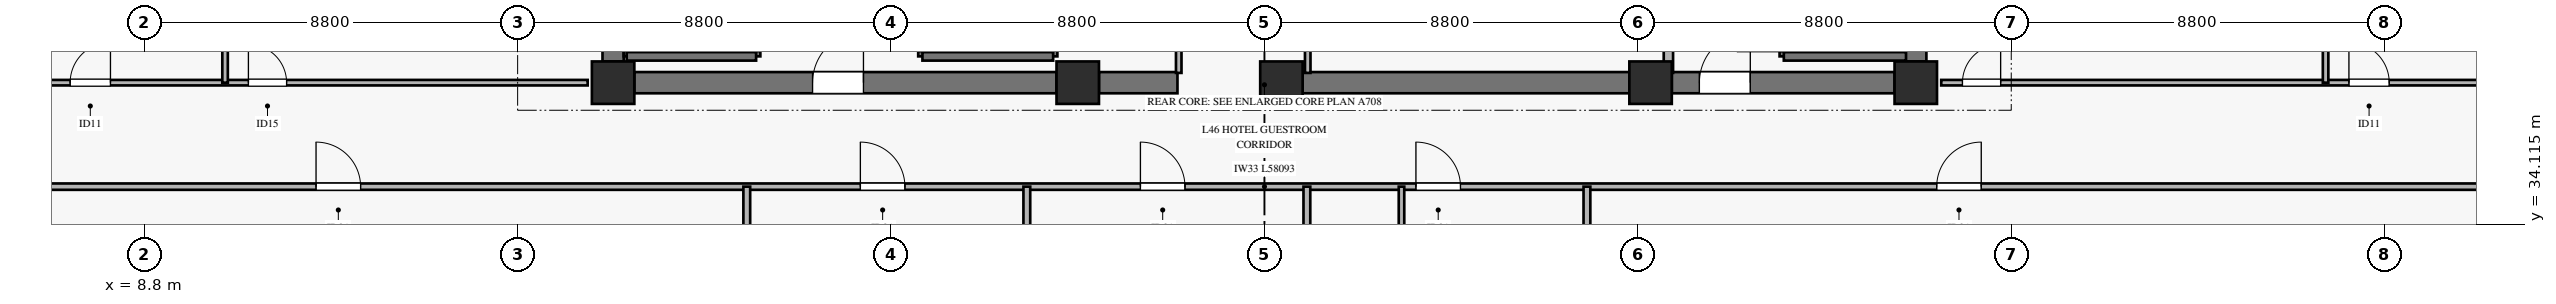
"""IFC4 building model, lengths in metres.
Left out: names, types, materials, properties, quantities, classifications, styles, units other than length and angle.
Written with IfcOpenShell. Run it as: python <this file> out.ifc"""

import sys

from ifc_helpers import new_model, si_unit, direction, frame, frame_2d, origin, origin_2d, place, context, subcontext, project, spatial, rectangle, extrude, source, transform, mapped, element, fill, save


model = new_model("IFC4")
c1 = context("Model", 3, precision=1e-05, world=origin(), true_north=direction((0.0, 1.0)))
c2 = subcontext(c1, "Body", "Model", "MODEL_VIEW")
j1 = project(units=[si_unit("LENGTHUNIT", "METRE"), si_unit("PLANEANGLEUNIT", "RADIAN")], contexts=[c1])
p1 = place(None, origin())
s1 = spatial("IfcSite", under=j1, at=p1, CompositionType="ELEMENT")
p2 = place(p1, origin())
s2 = spatial("IfcBuilding", under=s1, at=p2, CompositionType="ELEMENT")
p3 = place(p2, frame((0.0, 0.0, 184.2)))
s3 = spatial("IfcBuildingStorey", under=s2, at=p3, CompositionType="ELEMENT", Elevation=184.2)
m1 = source(origin(), c2, "Body", "SweptSolid", [
    extrude(rectangle(XDim=1.0, YDim=1.0, at=origin_2d()), origin(), (0.0, 0.0, 1.0), 3.27),
])
for number, where, z_axis, x_axis in (
    (1, (19.85, 37.45, 0.0), (0.0, 0.0, 1.0), (1.0, 0.0, 0.0)),
    (2, (30.8, 37.45, 0.0), (0.0, 0.0, 1.0), (1.0, 0.0, 0.0)),
    (3, (35.6, 37.45, 0.0), (0.0, 0.0, 1.0), (1.0, 0.0, 0.0)),
    (4, (44.3, 37.45, 0.0), (0.0, 0.0, 1.0), (1.0, 0.0, 0.0)),
    (5, (50.55, 37.45, 0.0), (0.0, 0.0, 1.0), (1.0, 0.0, 0.0)),
):
    element("IfcColumn", number, at=place(p3, frame(where, z_axis=z_axis, x_axis=x_axis)), inside=s3, PredefinedType="PILASTER", context=c2, shape_type="MappedRepresentation", body=[
        mapped(m1, transform((0.0, 0.0, 0.0), x_axis=(1.0, 0.0, 0.0), y_axis=(0.0, 1.0, 0.0), z_axis=(0.0, 0.0, 1.0), scale=1.0)),
    ])
p4 = place(p3, frame((20.35, 37.45, 0.0), z_axis=(0.0, 0.0, 1.0), x_axis=(1.0, 0.0, 0.0)))
e6 = element("IfcWall", 6, at=p4, inside=s3, PredefinedType="SHEAR", context=c2, shape_type="SweptSolid", body=[
    extrude(rectangle(XDim=9.95, YDim=0.5, at=frame_2d((4.975, 0.0))), origin(), (0.0, 0.0, 1.0), 3.27),
])
p5 = place(p4, frame((4.2, 0.0, 0.0)))
e7 = element("IfcOpeningElement", 7, at=p5, cuts=e6, PredefinedType="OPENING", context=c2, shape_type="SweptSolid", body=[
    extrude(rectangle(XDim=1.2, YDim=2.15, at=frame_2d((0.6, 1.075))), frame((0.0, 0.26, 0.0), z_axis=(0.0, -1.0, 0.0), x_axis=(1.0, 0.0, 0.0)), (0.0, 0.0, 1.0), 0.52),
])
p6 = place(p3, frame((31.3, 37.45, 0.0), z_axis=(0.0, 0.0, 1.0), x_axis=(1.0, 0.0, 0.0)))
e8 = element("IfcWall", 8, at=p6, inside=s3, PredefinedType="SHEAR", context=c2, shape_type="SweptSolid", body=[
    extrude(rectangle(XDim=1.85, YDim=0.5, at=frame_2d((0.925, 0.0))), origin(), (0.0, 0.0, 1.0), 3.27),
])
p7 = place(p3, frame((36.1, 37.45, 0.0), z_axis=(0.0, 0.0, 1.0), x_axis=(1.0, 0.0, 0.0)))
e9 = element("IfcWall", 9, at=p7, inside=s3, PredefinedType="SHEAR", context=c2, shape_type="SweptSolid", body=[
    extrude(rectangle(XDim=7.7, YDim=0.5, at=frame_2d((3.85, 0.0))), origin(), (0.0, 0.0, 1.0), 3.27),
])
p8 = place(p3, frame((44.8, 37.45, 0.0), z_axis=(0.0, 0.0, 1.0), x_axis=(1.0, 0.0, 0.0)))
e10 = element("IfcWall", 10, at=p8, inside=s3, PredefinedType="SHEAR", context=c2, shape_type="SweptSolid", body=[
    extrude(rectangle(XDim=5.25, YDim=0.5, at=frame_2d((2.625, 0.0))), origin(), (0.0, 0.0, 1.0), 3.27),
])
p9 = place(p8, frame((0.65, 0.0, 0.0)))
e11 = element("IfcOpeningElement", 11, at=p9, cuts=e10, PredefinedType="OPENING", context=c2, shape_type="SweptSolid", body=[
    extrude(rectangle(XDim=1.2, YDim=2.15, at=frame_2d((0.6, 1.075))), frame((0.0, 0.26, 0.0), z_axis=(0.0, -1.0, 0.0), x_axis=(1.0, 0.0, 0.0)), (0.0, 0.0, 1.0), 0.52),
])
for number, where, z_axis, x_axis in (
    (12, (19.85, 37.95, 0.0), (0.0, 0.0, 1.0), (0.0, 1.0, 0.0)),
    (13, (50.55, 37.95, 0.0), (0.0, 0.0, 1.0), (0.0, 1.0, 0.0)),
):
    element("IfcWall", number, at=place(p3, frame(where, z_axis=z_axis, x_axis=x_axis)), inside=s3, PredefinedType="SHEAR", context=c2, shape_type="SweptSolid", body=[
        extrude(rectangle(XDim=8.1, YDim=0.5, at=frame_2d((4.05, 0.0))), origin(), (0.0, 0.0, 1.0), 3.27),
    ])
p10 = place(p3, frame((20.17, 38.07, 0.0), z_axis=(0.0, 0.0, 1.0), x_axis=(0.0, 1.0, 0.0)))
e14 = element("IfcWall", 14, at=p10, inside=s3, PredefinedType="SOLIDWALL", context=c2, shape_type="SweptSolid", body=[
    extrude(rectangle(XDim=7.25, YDim=0.14, at=frame_2d((3.625, 0.0))), origin(), (0.0, 0.0, 1.0), 3.5),
])
p11 = place(p3, frame((23.22, 38.07, 0.0), z_axis=(0.0, 0.0, 1.0), x_axis=(0.0, 1.0, 0.0)))
e15 = element("IfcWall", 15, at=p11, inside=s3, PredefinedType="SOLIDWALL", context=c2, shape_type="SweptSolid", body=[
    extrude(rectangle(XDim=7.25, YDim=0.2, at=frame_2d((3.625, 0.0))), origin(), (0.0, 0.0, 1.0), 3.5),
])
p12 = place(p11, frame((0.11, 0.0, 0.0)))
e16 = element("IfcOpeningElement", 16, at=p12, cuts=e15, PredefinedType="OPENING", context=c2, shape_type="SweptSolid", body=[
    extrude(rectangle(XDim=1.1, YDim=2.15, at=frame_2d((0.55, 1.075))), frame((0.0, 0.11, 0.0), z_axis=(0.0, -1.0, 0.0), x_axis=(1.0, 0.0, 0.0)), (0.0, 0.0, 1.0), 0.22),
])
p13 = place(p3, frame((20.17, 38.07, 0.0), z_axis=(0.0, 0.0, 1.0), x_axis=(1.0, 0.0, 0.0)))
e17 = element("IfcWall", 17, at=p13, inside=s3, PredefinedType="SOLIDWALL", context=c2, shape_type="SweptSolid", body=[
    extrude(rectangle(XDim=3.05, YDim=0.2, at=frame_2d((1.525, 0.0))), origin(), (0.0, 0.0, 1.0), 3.5),
])
p14 = place(p3, frame((27.14, 38.07, 0.0), z_axis=(0.0, 0.0, 1.0), x_axis=(0.0, 1.0, 0.0)))
e18 = element("IfcWall", 18, at=p14, inside=s3, PredefinedType="SOLIDWALL", context=c2, shape_type="SweptSolid", body=[
    extrude(rectangle(XDim=7.25, YDim=0.2, at=frame_2d((3.625, 0.0))), origin(), (0.0, 0.0, 1.0), 3.5),
])
p15 = place(p14, frame((0.11, 0.0, 0.0)))
e19 = element("IfcOpeningElement", 19, at=p15, cuts=e18, PredefinedType="OPENING", context=c2, shape_type="SweptSolid", body=[
    extrude(rectangle(XDim=1.1, YDim=2.15, at=frame_2d((0.55, 1.075))), frame((0.0, 0.11, 0.0), z_axis=(0.0, -1.0, 0.0), x_axis=(1.0, 0.0, 0.0)), (0.0, 0.0, 1.0), 0.22),
])
p16 = place(p3, frame((30.22, 38.07, 0.0), z_axis=(0.0, 0.0, 1.0), x_axis=(0.0, 1.0, 0.0)))
e20 = element("IfcWall", 20, at=p16, inside=s3, PredefinedType="SOLIDWALL", context=c2, shape_type="SweptSolid", body=[
    extrude(rectangle(XDim=7.25, YDim=0.2, at=frame_2d((3.625, 0.0))), origin(), (0.0, 0.0, 1.0), 3.5),
])
p17 = place(p3, frame((27.14, 38.07, 0.0), z_axis=(0.0, 0.0, 1.0), x_axis=(1.0, 0.0, 0.0)))
e21 = element("IfcWall", 21, at=p17, inside=s3, PredefinedType="SOLIDWALL", context=c2, shape_type="SweptSolid", body=[
    extrude(rectangle(XDim=3.08, YDim=0.2, at=frame_2d((1.54, 0.0))), origin(), (0.0, 0.0, 1.0), 3.5),
])
p18 = place(p3, frame((47.44, 38.07, 0.0), z_axis=(0.0, 0.0, 1.0), x_axis=(0.0, 1.0, 0.0)))
e22 = element("IfcWall", 22, at=p18, inside=s3, PredefinedType="SOLIDWALL", context=c2, shape_type="SweptSolid", body=[
    extrude(rectangle(XDim=7.25, YDim=0.2, at=frame_2d((3.625, 0.0))), origin(), (0.0, 0.0, 1.0), 3.5),
])
p19 = place(p18, frame((0.11, 0.0, 0.0)))
e23 = element("IfcOpeningElement", 23, at=p19, cuts=e22, PredefinedType="OPENING", context=c2, shape_type="SweptSolid", body=[
    extrude(rectangle(XDim=1.1, YDim=2.15, at=frame_2d((0.55, 1.075))), frame((0.0, 0.11, 0.0), z_axis=(0.0, -1.0, 0.0), x_axis=(1.0, 0.0, 0.0)), (0.0, 0.0, 1.0), 0.22),
])
p20 = place(p3, frame((47.44, 38.07, 0.0), z_axis=(0.0, 0.0, 1.0), x_axis=(1.0, 0.0, 0.0)))
e24 = element("IfcWall", 24, at=p20, inside=s3, PredefinedType="SOLIDWALL", context=c2, shape_type="SweptSolid", body=[
    extrude(rectangle(XDim=2.88, YDim=0.2, at=frame_2d((1.44, 0.0))), origin(), (0.0, 0.0, 1.0), 3.5),
])
p21 = place(p3, frame((44.72, 37.68, 0.0), z_axis=(0.0, 0.0, 1.0), x_axis=(0.0, 1.0, 0.0)))
e25 = element("IfcWall", 25, at=p21, inside=s3, PredefinedType="SOLIDWALL", context=c2, shape_type="SweptSolid", body=[
    extrude(rectangle(XDim=7.54, YDim=0.22, at=frame_2d((3.77, 0.0))), origin(), (0.0, 0.0, 1.0), 3.27),
])
p22 = place(p3, frame((33.18, 37.68, 0.0), z_axis=(0.0, 0.0, 1.0), x_axis=(0.0, 1.0, 0.0)))
e26 = element("IfcWall", 26, at=p22, inside=s3, PredefinedType="PARTITIONING", context=c2, shape_type="SweptSolid", body=[
    extrude(rectangle(XDim=6.47, YDim=0.13, at=frame_2d((3.235, 0.0))), origin(), (0.0, 0.0, 1.0), 2.355),
])
p23 = place(p22, frame((0.92, 0.0, 0.0)))
e27 = element("IfcOpeningElement", 27, at=p23, cuts=e26, PredefinedType="OPENING", context=c2, shape_type="SweptSolid", body=[
    extrude(rectangle(XDim=0.9, YDim=2.1, at=frame_2d((0.45, 1.05))), frame((0.0, 0.075, 0.0), z_axis=(0.0, -1.0, 0.0), x_axis=(1.0, 0.0, 0.0)), (0.0, 0.0, 1.0), 0.15),
])
p24 = place(p22, frame((3.92, 0.0, 0.0)))
e28 = element("IfcOpeningElement", 28, at=p24, cuts=e26, PredefinedType="OPENING", context=c2, shape_type="SweptSolid", body=[
    extrude(rectangle(XDim=0.9, YDim=2.1, at=frame_2d((0.45, 1.05))), frame((0.0, 0.075, 0.0), z_axis=(0.0, -1.0, 0.0), x_axis=(1.0, 0.0, 0.0)), (0.0, 0.0, 1.0), 0.15),
])
p25 = place(p3, frame((36.22, 37.68, 0.0), z_axis=(0.0, 0.0, 1.0), x_axis=(0.0, 1.0, 0.0)))
e29 = element("IfcWall", 29, at=p25, inside=s3, PredefinedType="PARTITIONING", context=c2, shape_type="SweptSolid", body=[
    extrude(rectangle(XDim=2.24, YDim=0.13, at=frame_2d((1.12, 0.0))), origin(), (0.0, 0.0, 1.0), 3.27),
])
p26 = place(p25, frame((0.88, 0.0, 0.0)))
e30 = element("IfcOpeningElement", 30, at=p26, cuts=e29, PredefinedType="OPENING", context=c2, shape_type="SweptSolid", body=[
    extrude(rectangle(XDim=0.9, YDim=2.1, at=frame_2d((0.45, 1.05))), frame((0.0, 0.075, 0.0), z_axis=(0.0, -1.0, 0.0), x_axis=(1.0, 0.0, 0.0)), (0.0, 0.0, 1.0), 0.15),
])
p27 = place(p3, frame((6.154, 35.0, 0.0), z_axis=(0.0, 0.0, 1.0), x_axis=(1.0, 0.0, 0.0)))
e31 = element("IfcWall", 31, at=p27, inside=s3, PredefinedType="PARTITIONING", context=c2, shape_type="SweptSolid", body=[
    extrude(rectangle(XDim=58.093, YDim=0.15, at=frame_2d((29.046, 0.0))), origin(), (0.0, 0.0, 1.0), 2.455),
])
p28 = place(p27, frame((6.695, 0.0, 0.0)))
e32 = element("IfcOpeningElement", 32, at=p28, cuts=e31, PredefinedType="OPENING", context=c2, shape_type="SweptSolid", body=[
    extrude(rectangle(XDim=1.05, YDim=2.15, at=frame_2d((0.525, 1.075))), frame((0.0, 0.085, 0.0), z_axis=(0.0, -1.0, 0.0), x_axis=(1.0, 0.0, 0.0)), (0.0, 0.0, 1.0), 0.17),
])
p29 = place(p27, frame((19.523, 0.0, 0.0)))
e33 = element("IfcOpeningElement", 33, at=p29, cuts=e31, PredefinedType="OPENING", context=c2, shape_type="SweptSolid", body=[
    extrude(rectangle(XDim=1.05, YDim=2.15, at=frame_2d((0.525, 1.075))), frame((0.0, 0.085, 0.0), z_axis=(0.0, -1.0, 0.0), x_axis=(1.0, 0.0, 0.0)), (0.0, 0.0, 1.0), 0.17),
])
p30 = place(p27, frame((26.123, 0.0, 0.0)))
e34 = element("IfcOpeningElement", 34, at=p30, cuts=e31, PredefinedType="OPENING", context=c2, shape_type="SweptSolid", body=[
    extrude(rectangle(XDim=1.05, YDim=2.15, at=frame_2d((0.525, 1.075))), frame((0.0, 0.085, 0.0), z_axis=(0.0, -1.0, 0.0), x_axis=(1.0, 0.0, 0.0)), (0.0, 0.0, 1.0), 0.17),
])
p31 = place(p27, frame((32.616, 0.0, 0.0)))
e35 = element("IfcOpeningElement", 35, at=p31, cuts=e31, PredefinedType="OPENING", context=c2, shape_type="SweptSolid", body=[
    extrude(rectangle(XDim=1.05, YDim=2.15, at=frame_2d((0.525, 1.075))), frame((0.0, 0.085, 0.0), z_axis=(0.0, -1.0, 0.0), x_axis=(1.0, 0.0, 0.0)), (0.0, 0.0, 1.0), 0.17),
])
p32 = place(p27, frame((44.889, 0.0, 0.0)))
e36 = element("IfcOpeningElement", 36, at=p32, cuts=e31, PredefinedType="OPENING", context=c2, shape_type="SweptSolid", body=[
    extrude(rectangle(XDim=1.05, YDim=2.15, at=frame_2d((0.525, 1.075))), frame((0.0, 0.085, 0.0), z_axis=(0.0, -1.0, 0.0), x_axis=(1.0, 0.0, 0.0)), (0.0, 0.0, 1.0), 0.17),
])
for number, where, z_axis, x_axis in (
    (37, (23.0, 10.154, 0.0), (0.0, 0.0, 1.0), (0.0, 1.0, 0.0)),
    (38, (29.6, 10.154, 0.0), (0.0, 0.0, 1.0), (0.0, 1.0, 0.0)),
    (39, (36.2, 10.154, 0.0), (0.0, 0.0, 1.0), (0.0, 1.0, 0.0)),
):
    element("IfcWall", number, at=place(p3, frame(where, z_axis=z_axis, x_axis=x_axis)), inside=s3, PredefinedType="PARTITIONING", context=c2, shape_type="SweptSolid", body=[
        extrude(rectangle(XDim=24.846, YDim=0.16, at=frame_2d((12.423, 0.0))), origin(), (0.0, 0.0, 1.0), 2.755),
    ])
p33 = place(p3, frame((38.43, 32.45, 0.0), z_axis=(0.0, 0.0, 1.0), x_axis=(0.0, 1.0, 0.0)))
e40 = element("IfcWall", 40, at=p33, inside=s3, PredefinedType="PARTITIONING", context=c2, shape_type="SweptSolid", body=[
    extrude(rectangle(XDim=2.55, YDim=0.13, at=frame_2d((1.275, 0.0))), origin(), (0.0, 0.0, 1.0), 2.805),
])
p34 = place(p3, frame((42.8, 10.154, 0.0), z_axis=(0.0, 0.0, 1.0), x_axis=(0.0, 1.0, 0.0)))
e41 = element("IfcWall", 41, at=p34, inside=s3, PredefinedType="PARTITIONING", context=c2, shape_type="SweptSolid", body=[
    extrude(rectangle(XDim=24.846, YDim=0.16, at=frame_2d((12.423, 0.0))), origin(), (0.0, 0.0, 1.0), 2.755),
])
p35 = place(p3, frame((6.154, 37.45, 0.0), z_axis=(0.0, 0.0, 1.0), x_axis=(1.0, 0.0, 0.0)))
e42 = element("IfcWall", 42, at=p35, inside=s3, PredefinedType="PARTITIONING", context=c2, shape_type="SweptSolid", body=[
    extrude(rectangle(XDim=13.096, YDim=0.13, at=frame_2d((6.548, 0.0))), origin(), (0.0, 0.0, 1.0), 2.755),
])
p36 = place(p35, frame((0.9, 0.0, 0.0)))
e43 = element("IfcOpeningElement", 43, at=p36, cuts=e42, PredefinedType="OPENING", context=c2, shape_type="SweptSolid", body=[
    extrude(rectangle(XDim=0.95, YDim=2.1, at=frame_2d((0.475, 1.05))), frame((0.0, 0.075, 0.0), z_axis=(0.0, -1.0, 0.0), x_axis=(1.0, 0.0, 0.0)), (0.0, 0.0, 1.0), 0.15),
])
p37 = place(p35, frame((5.101, 0.0, 0.0)))
e44 = element("IfcOpeningElement", 44, at=p37, cuts=e42, PredefinedType="OPENING", context=c2, shape_type="SweptSolid", body=[
    extrude(rectangle(XDim=0.9, YDim=2.1, at=frame_2d((0.45, 1.05))), frame((0.0, 0.075, 0.0), z_axis=(0.0, -1.0, 0.0), x_axis=(1.0, 0.0, 0.0)), (0.0, 0.0, 1.0), 0.15),
])
p38 = place(p3, frame((10.705, 37.45, 0.0), z_axis=(0.0, 0.0, 1.0), x_axis=(0.0, 1.0, 0.0)))
e45 = element("IfcWall", 45, at=p38, inside=s3, PredefinedType="PARTITIONING", context=c2, shape_type="SweptSolid", body=[
    extrude(rectangle(XDim=8.8, YDim=0.13, at=frame_2d((4.4, 0.0))), origin(), (0.0, 0.0, 1.0), 3.27),
])
p39 = place(p3, frame((51.15, 37.45, 0.0), z_axis=(0.0, 0.0, 1.0), x_axis=(1.0, 0.0, 0.0)))
e46 = element("IfcWall", 46, at=p39, inside=s3, PredefinedType="PARTITIONING", context=c2, shape_type="SweptSolid", body=[
    extrude(rectangle(XDim=13.097, YDim=0.13, at=frame_2d((6.549, 0.0))), origin(), (0.0, 0.0, 1.0), 2.755),
])
p40 = place(p39, frame((0.5, 0.0, 0.0)))
e47 = element("IfcOpeningElement", 47, at=p40, cuts=e46, PredefinedType="OPENING", context=c2, shape_type="SweptSolid", body=[
    extrude(rectangle(XDim=0.9, YDim=2.1, at=frame_2d((0.45, 1.05))), frame((0.0, 0.075, 0.0), z_axis=(0.0, -1.0, 0.0), x_axis=(1.0, 0.0, 0.0)), (0.0, 0.0, 1.0), 0.15),
])
p41 = place(p39, frame((9.608, 0.0, 0.0)))
e48 = element("IfcOpeningElement", 48, at=p41, cuts=e46, PredefinedType="OPENING", context=c2, shape_type="SweptSolid", body=[
    extrude(rectangle(XDim=0.95, YDim=2.1, at=frame_2d((0.475, 1.05))), frame((0.0, 0.075, 0.0), z_axis=(0.0, -1.0, 0.0), x_axis=(1.0, 0.0, 0.0)), (0.0, 0.0, 1.0), 0.15),
])
p42 = place(p3, frame((60.208, 37.45, 0.0), z_axis=(0.0, 0.0, 1.0), x_axis=(0.0, 1.0, 0.0)))
e49 = element("IfcWall", 49, at=p42, inside=s3, PredefinedType="PARTITIONING", context=c2, shape_type="SweptSolid", body=[
    extrude(rectangle(XDim=8.8, YDim=0.13, at=frame_2d((4.4, 0.0))), origin(), (0.0, 0.0, 1.0), 3.27),
])
m2 = source(origin(), c2, "Body", "SweptSolid", [
    extrude(rectangle(XDim=1.2, YDim=2.15, at=frame_2d((0.6, 1.075))), frame((0.0, 0.025, 0.0), z_axis=(0.0, -1.0, 0.0), x_axis=(1.0, 0.0, 0.0)), (0.0, 0.0, 1.0), 0.05),
])
p43 = place(p5, origin())
e50 = element("IfcDoor", 50, at=p43, inside=s3, OperationType="SINGLE_SWING_RIGHT", PredefinedType="DOOR", context=c2, shape_type="MappedRepresentation", body=[
    mapped(m2, transform((0.0, 0.0, 0.0), x_axis=(1.0, 0.0, 0.0), y_axis=(0.0, 1.0, 0.0), z_axis=(0.0, 0.0, 1.0), scale=1.0)),
])
fill(e7, e50)
p44 = place(p9, origin())
e51 = element("IfcDoor", 51, at=p44, inside=s3, OperationType="SINGLE_SWING_RIGHT", PredefinedType="DOOR", context=c2, shape_type="MappedRepresentation", body=[
    mapped(m2, transform((0.0, 0.0, 0.0), x_axis=(1.0, 0.0, 0.0), y_axis=(0.0, 1.0, 0.0), z_axis=(0.0, 0.0, 1.0), scale=1.0)),
])
fill(e11, e51)
m3 = source(origin(), c2, "Body", "SweptSolid", [
    extrude(rectangle(XDim=1.05, YDim=2.15, at=frame_2d((0.525, 1.075))), frame((0.0, 0.025, 0.0), z_axis=(0.0, -1.0, 0.0), x_axis=(1.0, 0.0, 0.0)), (0.0, 0.0, 1.0), 0.05),
])
p45 = place(p28, origin())
e52 = element("IfcDoor", 52, at=p45, inside=s3, OperationType="SINGLE_SWING_LEFT", PredefinedType="DOOR", context=c2, shape_type="MappedRepresentation", body=[
    mapped(m3, transform((0.0, 0.0, 0.0), x_axis=(1.0, 0.0, 0.0), y_axis=(0.0, 1.0, 0.0), z_axis=(0.0, 0.0, 1.0), scale=1.0)),
])
fill(e32, e52)
p46 = place(p29, origin())
e53 = element("IfcDoor", 53, at=p46, inside=s3, OperationType="SINGLE_SWING_LEFT", PredefinedType="DOOR", context=c2, shape_type="MappedRepresentation", body=[
    mapped(m3, transform((0.0, 0.0, 0.0), x_axis=(1.0, 0.0, 0.0), y_axis=(0.0, 1.0, 0.0), z_axis=(0.0, 0.0, 1.0), scale=1.0)),
])
fill(e33, e53)
p47 = place(p30, origin())
e54 = element("IfcDoor", 54, at=p47, inside=s3, OperationType="SINGLE_SWING_LEFT", PredefinedType="DOOR", context=c2, shape_type="MappedRepresentation", body=[
    mapped(m3, transform((0.0, 0.0, 0.0), x_axis=(1.0, 0.0, 0.0), y_axis=(0.0, 1.0, 0.0), z_axis=(0.0, 0.0, 1.0), scale=1.0)),
])
fill(e34, e54)
p48 = place(p31, origin())
e55 = element("IfcDoor", 55, at=p48, inside=s3, OperationType="SINGLE_SWING_LEFT", PredefinedType="DOOR", context=c2, shape_type="MappedRepresentation", body=[
    mapped(m3, transform((0.0, 0.0, 0.0), x_axis=(1.0, 0.0, 0.0), y_axis=(0.0, 1.0, 0.0), z_axis=(0.0, 0.0, 1.0), scale=1.0)),
])
fill(e35, e55)
p49 = place(p32, origin())
e56 = element("IfcDoor", 56, at=p49, inside=s3, OperationType="SINGLE_SWING_RIGHT", PredefinedType="DOOR", context=c2, shape_type="MappedRepresentation", body=[
    mapped(m3, transform((0.0, 0.0, 0.0), x_axis=(1.0, 0.0, 0.0), y_axis=(0.0, 1.0, 0.0), z_axis=(0.0, 0.0, 1.0), scale=1.0)),
])
fill(e36, e56)
m4 = source(origin(), c2, "Body", "SweptSolid", [
    extrude(rectangle(XDim=0.95, YDim=2.1, at=frame_2d((0.475, 1.05))), frame((0.0, 0.025, 0.0), z_axis=(0.0, -1.0, 0.0), x_axis=(1.0, 0.0, 0.0)), (0.0, 0.0, 1.0), 0.05),
])
p50 = place(p36, origin())
e57 = element("IfcDoor", 57, at=p50, inside=s3, OperationType="SINGLE_SWING_RIGHT", PredefinedType="DOOR", context=c2, shape_type="MappedRepresentation", body=[
    mapped(m4, transform((0.0, 0.0, 0.0), x_axis=(1.0, 0.0, 0.0), y_axis=(0.0, 1.0, 0.0), z_axis=(0.0, 0.0, 1.0), scale=1.0)),
])
fill(e43, e57)
m5 = source(origin(), c2, "Body", "SweptSolid", [
    extrude(rectangle(XDim=0.9, YDim=2.1, at=frame_2d((0.45, 1.05))), frame((0.0, 0.025, 0.0), z_axis=(0.0, -1.0, 0.0), x_axis=(1.0, 0.0, 0.0)), (0.0, 0.0, 1.0), 0.05),
])
p51 = place(p37, origin())
e58 = element("IfcDoor", 58, at=p51, inside=s3, OperationType="SINGLE_SWING_LEFT", PredefinedType="DOOR", context=c2, shape_type="MappedRepresentation", body=[
    mapped(m5, transform((0.0, 0.0, 0.0), x_axis=(1.0, 0.0, 0.0), y_axis=(0.0, 1.0, 0.0), z_axis=(0.0, 0.0, 1.0), scale=1.0)),
])
fill(e44, e58)
p52 = place(p40, origin())
e59 = element("IfcDoor", 59, at=p52, inside=s3, OperationType="SINGLE_SWING_RIGHT", PredefinedType="DOOR", context=c2, shape_type="MappedRepresentation", body=[
    mapped(m5, transform((0.0, 0.0, 0.0), x_axis=(1.0, 0.0, 0.0), y_axis=(0.0, 1.0, 0.0), z_axis=(0.0, 0.0, 1.0), scale=1.0)),
])
fill(e47, e59)
p53 = place(p41, origin())
e60 = element("IfcDoor", 60, at=p53, inside=s3, OperationType="SINGLE_SWING_LEFT", PredefinedType="DOOR", context=c2, shape_type="MappedRepresentation", body=[
    mapped(m4, transform((0.0, 0.0, 0.0), x_axis=(1.0, 0.0, 0.0), y_axis=(0.0, 1.0, 0.0), z_axis=(0.0, 0.0, 1.0), scale=1.0)),
])
fill(e48, e60)
save(model, sys.argv[1])
